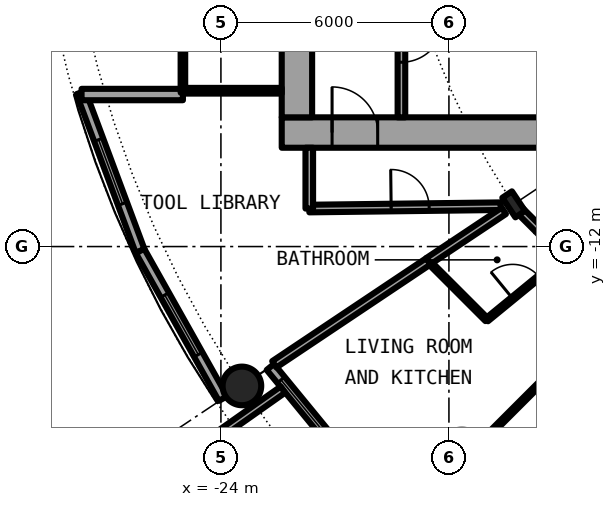
"""IFC4 building model, lengths in metres.
Left out: names, types, materials, properties, quantities, classifications, styles, units other than length and angle.
Written with IfcOpenShell. Run it as: python <this file> out.ifc"""

import sys

from ifc_helpers import new_model, si_unit, direction, frame, frame_2d, origin, origin_2d, place, context, subcontext, project, spatial, rectangle, hollow_circle, i_section, extrude, element, fill, save


model = new_model("IFC4")
c1 = context("Model", 3, precision=1e-05, world=origin(), true_north=direction((0.0, 1.0)))
c2 = subcontext(c1, "Body", "Model", "MODEL_VIEW")
j1 = project(units=[si_unit("LENGTHUNIT", "METRE"), si_unit("PLANEANGLEUNIT", "RADIAN")], contexts=[c1])
p1 = place(None, origin())
s1 = spatial("IfcSite", under=j1, at=p1, CompositionType="ELEMENT")
p2 = place(p1, origin())
s2 = spatial("IfcBuilding", under=s1, at=p2, CompositionType="ELEMENT")
p3 = place(p2, frame((0.0, 0.0, 22.8)))
s3 = spatial("IfcBuildingStorey", under=s2, at=p3, CompositionType="ELEMENT", Elevation=22.8)
p4 = place(p3, frame((-23.448, -15.667, 0.0), z_axis=(0.0, 0.0, 1.0), x_axis=(1.0, 0.0, 0.0)))
e1 = element("IfcColumn", 1, at=p4, inside=s3, PredefinedType="COLUMN", context=c2, shape_type="SweptSolid", body=[
    extrude(hollow_circle(Radius=0.508, WallThickness=0.05, at=origin_2d()), origin(), (0.0, 0.0, 1.0), 3.05),
])
p5 = place(p3, frame((-16.297, -10.889, 0.0), z_axis=(0.0, 0.0, 1.0), x_axis=(-0.831469612303, -0.55557023302, 0.0)))
e2 = element("IfcColumn", 2, at=p5, inside=s3, PredefinedType="COLUMN", context=c2, shape_type="SweptSolid", body=[
    extrude(i_section(OverallWidth=0.305, OverallDepth=0.62, WebThickness=0.021, FlangeThickness=0.04, FilletRadius=0.027, at=origin_2d()), origin(), (0.0, 0.0, 1.0), 3.05),
])
p6 = place(p3, frame((-22.699, -15.167, 0.0), z_axis=(0.0, 0.0, 1.0), x_axis=(0.634382322723, -0.773019449054, 0.0)))
e3 = element("IfcWall", 3, at=p6, inside=s3, PredefinedType="SOLIDWALL", context=c2, shape_type="SweptSolid", body=[
    extrude(rectangle(XDim=5.352, YDim=0.25, at=frame_2d((2.676, 0.0))), origin(), (0.0, 0.0, 1.0), 2.7),
])
p7 = place(p6, frame((0.441, 0.0, 0.3)))
e4 = element("IfcOpeningElement", 4, at=p7, cuts=e3, PredefinedType="OPENING", context=c2, shape_type="SweptSolid", body=[
    extrude(rectangle(XDim=1.8, YDim=2.1, at=frame_2d((0.9, 1.05))), frame((0.0, 0.135, 0.0), z_axis=(0.0, -1.0, 0.0), x_axis=(1.0, 0.0, 0.0)), (0.0, 0.0, 1.0), 0.27),
])
p8 = place(p6, frame((3.51, 0.0, 0.0)))
e5 = element("IfcOpeningElement", 5, at=p8, cuts=e3, PredefinedType="OPENING", context=c2, shape_type="SweptSolid", body=[
    extrude(rectangle(XDim=1.0, YDim=2.2, at=frame_2d((0.5, 1.1))), frame((0.0, 0.135, 0.0), z_axis=(0.0, -1.0, 0.0), x_axis=(1.0, 0.0, 0.0)), (0.0, 0.0, 1.0), 0.27),
])
p9 = place(p3, frame((-22.37, -15.765, -0.03), z_axis=(0.0, 0.0, 1.0), x_axis=(-0.817256123454, -0.576274612209, 0.0)))
e6 = element("IfcWall", 6, at=p9, inside=s3, PredefinedType="SOLIDWALL", context=c2, shape_type="SweptSolid", body=[
    extrude(rectangle(XDim=2.933, YDim=0.2, at=frame_2d((1.466, 0.0))), origin(), (0.0, 0.0, 1.0), 2.73),
])
p10 = place(p3, frame((-27.682, -7.945, 0.0), z_axis=(0.0, 0.0, 1.0), x_axis=(0.349247811493, -0.937030397675, 0.0)))
e7 = element("IfcWall", 7, at=p10, inside=s3, PredefinedType="SOLIDWALL", context=c2, shape_type="SweptSolid", body=[
    extrude(rectangle(XDim=4.452, YDim=0.25, at=frame_2d((2.226, 0.0))), origin(), (0.0, 0.0, 1.0), 2.7),
])
p11 = place(p10, frame((1.327, 0.0, 0.3)))
e8 = element("IfcOpeningElement", 8, at=p11, cuts=e7, PredefinedType="OPENING", context=c2, shape_type="SweptSolid", body=[
    extrude(rectangle(XDim=1.8, YDim=2.1, at=frame_2d((0.9, 1.05))), frame((0.0, 0.135, 0.0), z_axis=(0.0, -1.0, 0.0), x_axis=(1.0, 0.0, 0.0)), (0.0, 0.0, 1.0), 0.27),
])
p12 = place(p3, frame((-26.127, -12.117, 0.0), z_axis=(0.0, 0.0, 1.0), x_axis=(0.489696356642, -0.871893042919, 0.0)))
e9 = element("IfcWall", 9, at=p12, inside=s3, PredefinedType="SOLIDWALL", context=c2, shape_type="SweptSolid", body=[
    extrude(rectangle(XDim=4.454, YDim=0.25, at=frame_2d((2.227, 0.0))), origin(), (0.0, 0.0, 1.0), 2.7),
])
p13 = place(p12, frame((1.327, 0.0, 0.3)))
e10 = element("IfcOpeningElement", 10, at=p13, cuts=e9, PredefinedType="OPENING", context=c2, shape_type="SweptSolid", body=[
    extrude(rectangle(XDim=1.8, YDim=2.1, at=frame_2d((0.9, 1.05))), frame((0.0, 0.135, 0.0), z_axis=(0.0, -1.0, 0.0), x_axis=(1.0, 0.0, 0.0)), (0.0, 0.0, 1.0), 0.27),
])
p14 = place(p3, frame((-25.0, -8.0, 0.0), z_axis=(0.0, 0.0, 1.0), x_axis=(-1.0, 0.0, 0.0)))
e11 = element("IfcWall", 11, at=p14, inside=s3, PredefinedType="SOLIDWALL", context=c2, shape_type="SweptSolid", body=[
    extrude(rectangle(XDim=2.667, YDim=0.3, at=frame_2d((1.333, 0.0))), origin(), (0.0, 0.0, 1.0), 2.7),
])
p15 = place(p3, frame((-22.4, -9.0, 0.0), z_axis=(0.0, 0.0, 1.0), x_axis=(1.0, 0.0, 0.0)))
e12 = element("IfcWall", 12, at=p15, inside=s3, PredefinedType="SHEAR", context=c2, shape_type="SweptSolid", body=[
    extrude(rectangle(XDim=14.2, YDim=0.8, at=frame_2d((7.1, 0.0))), origin(), (0.0, 0.0, 1.0), 3.05),
])
p16 = place(p15, frame((1.325, 0.0, 0.0)))
e13 = element("IfcOpeningElement", 13, at=p16, cuts=e12, PredefinedType="OPENING", context=c2, shape_type="SweptSolid", body=[
    extrude(rectangle(XDim=1.2, YDim=2.3, at=frame_2d((0.6, 1.15))), frame((0.0, 0.41, 0.0), z_axis=(0.0, -1.0, 0.0), x_axis=(1.0, 0.0, 0.0)), (0.0, 0.0, 1.0), 0.82),
])
p17 = place(p3, frame((-22.0, -8.6, 0.0), z_axis=(0.0, 0.0, 1.0), x_axis=(0.0, 1.0, 0.0)))
e14 = element("IfcWall", 14, at=p17, inside=s3, PredefinedType="SHEAR", context=c2, shape_type="SweptSolid", body=[
    extrude(rectangle(XDim=17.2, YDim=0.8, at=frame_2d((8.6, 0.0))), origin(), (0.0, 0.0, 1.0), 3.05),
])
p18 = place(p17, frame((7.7, 0.0, 0.0)))
e15 = element("IfcOpeningElement", 15, at=p18, cuts=e14, PredefinedType="OPENING", context=c2, shape_type="SweptSolid", body=[
    extrude(rectangle(XDim=1.8, YDim=2.3, at=frame_2d((0.9, 1.15))), frame((0.0, 0.41, 0.0), z_axis=(0.0, -1.0, 0.0), x_axis=(1.0, 0.0, 0.0)), (0.0, 0.0, 1.0), 0.82),
])
p19 = place(p3, frame((-19.25, -1.575, 0.0), z_axis=(0.0, 0.0, 1.0), x_axis=(0.0, -1.0, 0.0)))
e16 = element("IfcWall", 16, at=p19, inside=s3, PredefinedType="SOLIDWALL", context=c2, shape_type="SweptSolid", body=[
    extrude(rectangle(XDim=7.025, YDim=0.2, at=frame_2d((3.513, 0.0))), origin(), (0.0, 0.0, 1.0), 2.7),
])
p20 = place(p19, frame((4.475, 0.0, 0.0)))
e17 = element("IfcOpeningElement", 17, at=p20, cuts=e16, PredefinedType="OPENING", context=c2, shape_type="SweptSolid", body=[
    extrude(rectangle(XDim=1.1, YDim=2.3, at=frame_2d((0.55, 1.15))), frame((0.0, 0.11, 0.0), z_axis=(0.0, -1.0, 0.0), x_axis=(1.0, 0.0, 0.0)), (0.0, 0.0, 1.0), 0.22),
])
p21 = place(p3, frame((-22.4, -7.9, 0.0), z_axis=(0.0, 0.0, 1.0), x_axis=(-1.0, 0.0, 0.0)))
e18 = element("IfcWall", 18, at=p21, inside=s3, PredefinedType="PARTITIONING", context=c2, shape_type="SweptSolid", body=[
    extrude(rectangle(XDim=2.54, YDim=0.15, at=frame_2d((1.27, 0.0))), origin(), (0.0, 0.0, 1.0), 2.7),
])
p22 = place(p3, frame((-25.0, 7.95, 0.0), z_axis=(0.0, 0.0, 1.0), x_axis=(0.0, -1.0, 0.0)))
e19 = element("IfcWall", 19, at=p22, inside=s3, PredefinedType="PARTITIONING", context=c2, shape_type="SweptSolid", body=[
    extrude(rectangle(XDim=15.9, YDim=0.12, at=frame_2d((7.95, 0.0))), origin(), (0.0, 0.0, 1.0), 2.7),
])
p23 = place(p22, frame((0.95, 0.0, 0.1)))
e20 = element("IfcOpeningElement", 20, at=p23, cuts=e19, PredefinedType="OPENING", context=c2, shape_type="SweptSolid", body=[
    extrude(rectangle(XDim=14.0, YDim=2.35, at=frame_2d((7.0, 1.175))), frame((0.0, 0.07, 0.0), z_axis=(0.0, -1.0, 0.0), x_axis=(1.0, 0.0, 0.0)), (0.0, 0.0, 1.0), 0.14),
])
p24 = place(p3, frame((-18.542, -12.389, 0.0), z_axis=(0.0, 0.0, 1.0), x_axis=(0.707106781187, -0.707106781187, 0.0)))
e21 = element("IfcWall", 21, at=p24, inside=s3, PredefinedType="PARTITIONING", context=c2, shape_type="SweptSolid", body=[
    extrude(rectangle(XDim=2.175, YDim=0.1, at=frame_2d((1.088, 0.0))), origin(), (0.0, 0.0, 1.0), 2.7),
])
p25 = place(p3, frame((-16.187, -10.999, 0.0), z_axis=(0.0, 0.0, 1.0), x_axis=(0.707106781187, -0.707106781187, 0.0)))
e22 = element("IfcWall", 22, at=p25, inside=s3, PredefinedType="PARTITIONING", context=c2, shape_type="SweptSolid", body=[
    extrude(rectangle(XDim=7.337, YDim=0.2, at=frame_2d((3.668, 0.0))), origin(), (0.0, 0.0, 1.0), 2.38),
])
p26 = place(p25, frame((4.124, 0.0, 0.0)))
e23 = element("IfcOpeningElement", 23, at=p26, cuts=e22, PredefinedType="OPENING", context=c2, shape_type="SweptSolid", body=[
    extrude(rectangle(XDim=1.0, YDim=2.3, at=frame_2d((0.5, 1.15))), frame((0.0, 0.11, 0.0), z_axis=(0.0, -1.0, 0.0), x_axis=(1.0, 0.0, 0.0)), (0.0, 0.0, 1.0), 0.22),
])
p27 = place(p3, frame((-21.675, -11.0, 0.0), z_axis=(0.0, 0.0, 1.0), x_axis=(0.99992425795, 0.012307654658, 0.0)))
e24 = element("IfcWall", 24, at=p27, inside=s3, PredefinedType="PARTITIONING", context=c2, shape_type="SweptSolid", body=[
    extrude(rectangle(XDim=5.039, YDim=0.2, at=frame_2d((2.519, 0.0))), origin(), (0.0, 0.0, 1.0), 2.7),
])
p28 = place(p27, frame((2.155, 0.0, 0.0)))
e25 = element("IfcOpeningElement", 25, at=p28, cuts=e24, PredefinedType="OPENING", context=c2, shape_type="SweptSolid", body=[
    extrude(rectangle(XDim=1.0, YDim=2.3, at=frame_2d((0.5, 1.15))), frame((0.0, 0.11, 0.0), z_axis=(0.0, -1.0, 0.0), x_axis=(1.0, 0.0, 0.0)), (0.0, 0.0, 1.0), 0.22),
])
p29 = place(p3, frame((-18.544, -12.387, 0.0), z_axis=(0.0, 0.0, 1.0), x_axis=(0.832066006555, 0.554676627176, 0.0)))
e26 = element("IfcWall", 26, at=p29, inside=s3, PredefinedType="PARTITIONING", context=c2, shape_type="SweptSolid", body=[
    extrude(rectangle(XDim=2.39, YDim=0.2, at=frame_2d((1.195, 0.0))), origin(), (0.0, 0.0, 1.0), 2.7),
])
p30 = place(p3, frame((-22.595, -15.098, 0.0), z_axis=(0.0, 0.0, 1.0), x_axis=(0.831387096605, 0.55569370664, 0.0)))
e27 = element("IfcWall", 27, at=p30, inside=s3, PredefinedType="PARTITIONING", context=c2, shape_type="SweptSolid", body=[
    extrude(rectangle(XDim=4.875, YDim=0.2, at=frame_2d((2.438, 0.0))), origin(), (0.0, 0.0, 1.0), 2.7),
])
p31 = place(p3, frame((-19.216, -19.216, 0.0), z_axis=(0.0, 0.0, 1.0), x_axis=(0.707106781187, 0.707106781187, 0.0)))
e28 = element("IfcWall", 28, at=p31, inside=s3, PredefinedType="PARTITIONING", context=c2, shape_type="SweptSolid", body=[
    extrude(rectangle(XDim=5.305, YDim=0.1, at=frame_2d((2.652, 0.0))), origin(), (0.0, 0.0, 1.0), 2.7),
])
p32 = place(p31, frame((2.202, 0.0, 0.0)))
e29 = element("IfcOpeningElement", 29, at=p32, cuts=e28, PredefinedType="OPENING", context=c2, shape_type="SweptSolid", body=[
    extrude(rectangle(XDim=0.9, YDim=2.3, at=frame_2d((0.45, 1.15))), frame((0.0, 0.06, 0.0), z_axis=(0.0, -1.0, 0.0), x_axis=(1.0, 0.0, 0.0)), (0.0, 0.0, 1.0), 0.12),
])
p33 = place(p3, frame((-17.004, -13.927, 0.0), z_axis=(0.0, 0.0, 1.0), x_axis=(0.77367517848, 0.633582447834, 0.0)))
e30 = element("IfcWall", 30, at=p33, inside=s3, PredefinedType="PARTITIONING", context=c2, shape_type="SweptSolid", body=[
    extrude(rectangle(XDim=2.661, YDim=0.1, at=frame_2d((1.331, 0.0))), origin(), (0.0, 0.0, 1.0), 2.7),
])
p34 = place(p33, frame((0.881, 0.0, 0.0)))
e31 = element("IfcOpeningElement", 31, at=p34, cuts=e30, PredefinedType="OPENING", context=c2, shape_type="SweptSolid", body=[
    extrude(rectangle(XDim=0.9, YDim=2.3, at=frame_2d((0.45, 1.15))), frame((0.0, 0.06, 0.0), z_axis=(0.0, -1.0, 0.0), x_axis=(1.0, 0.0, 0.0)), (0.0, 0.0, 1.0), 0.12),
])
p35 = place(p3, frame((-21.675, -11.0, 0.0), z_axis=(0.0, 0.0, 1.0), x_axis=(0.0, 1.0, 0.0)))
e32 = element("IfcWall", 32, at=p35, inside=s3, PredefinedType="PARTITIONING", context=c2, shape_type="SweptSolid", body=[
    extrude(rectangle(XDim=1.6, YDim=0.2, at=frame_2d((0.8, 0.0))), origin(), (0.0, 0.0, 1.0), 2.7),
])
p36 = place(p7, origin())
e33 = element("IfcWindow", 33, at=p36, inside=s3, PartitioningType="SINGLE_PANEL", PredefinedType="WINDOW", context=c2, shape_type="SweptSolid", body=[
    extrude(rectangle(XDim=1.8, YDim=2.1, at=frame_2d((0.9, 1.05))), frame((0.0, 0.03, 0.0), z_axis=(0.0, -1.0, 0.0), x_axis=(1.0, 0.0, 0.0)), (0.0, 0.0, 1.0), 0.06),
])
fill(e4, e33)
p37 = place(p11, origin())
e34 = element("IfcWindow", 34, at=p37, inside=s3, PartitioningType="SINGLE_PANEL", PredefinedType="WINDOW", context=c2, shape_type="SweptSolid", body=[
    extrude(rectangle(XDim=1.8, YDim=2.1, at=frame_2d((0.9, 1.05))), frame((0.0, 0.03, 0.0), z_axis=(0.0, -1.0, 0.0), x_axis=(1.0, 0.0, 0.0)), (0.0, 0.0, 1.0), 0.06),
])
fill(e8, e34)
p38 = place(p13, origin())
e35 = element("IfcWindow", 35, at=p38, inside=s3, PartitioningType="SINGLE_PANEL", PredefinedType="WINDOW", context=c2, shape_type="SweptSolid", body=[
    extrude(rectangle(XDim=1.8, YDim=2.1, at=frame_2d((0.9, 1.05))), frame((0.0, 0.03, 0.0), z_axis=(0.0, -1.0, 0.0), x_axis=(1.0, 0.0, 0.0)), (0.0, 0.0, 1.0), 0.06),
])
fill(e10, e35)
p39 = place(p20, origin())
e36 = element("IfcDoor", 36, at=p39, inside=s3, OperationType="SINGLE_SWING_LEFT", PredefinedType="DOOR", context=c2, shape_type="SweptSolid", body=[
    extrude(rectangle(XDim=1.1, YDim=2.3, at=frame_2d((0.55, 1.15))), frame((0.0, 0.025, 0.0), z_axis=(0.0, -1.0, 0.0), x_axis=(1.0, 0.0, 0.0)), (0.0, 0.0, 1.0), 0.05),
])
fill(e17, e36)
p40 = place(p16, origin())
e37 = element("IfcDoor", 37, at=p40, inside=s3, OperationType="SINGLE_SWING_RIGHT", PredefinedType="DOOR", context=c2, shape_type="SweptSolid", body=[
    extrude(rectangle(XDim=1.2, YDim=2.3, at=frame_2d((0.6, 1.15))), frame((0.0, 0.025, 0.0), z_axis=(0.0, -1.0, 0.0), x_axis=(1.0, 0.0, 0.0)), (0.0, 0.0, 1.0), 0.05),
])
fill(e13, e37)
p41 = place(p23, origin())
e38 = element("IfcWindow", 38, at=p41, inside=s3, PartitioningType="SINGLE_PANEL", PredefinedType="WINDOW", context=c2, shape_type="SweptSolid", body=[
    extrude(rectangle(XDim=14.0, YDim=2.35, at=frame_2d((7.0, 1.175))), frame((0.0, 0.03, 0.0), z_axis=(0.0, -1.0, 0.0), x_axis=(1.0, 0.0, 0.0)), (0.0, 0.0, 1.0), 0.06),
])
fill(e20, e38)
p42 = place(p34, origin())
e39 = element("IfcDoor", 39, at=p42, inside=s3, OperationType="SINGLE_SWING_RIGHT", PredefinedType="DOOR", context=c2, shape_type="SweptSolid", body=[
    extrude(rectangle(XDim=0.9, YDim=2.3, at=frame_2d((0.45, 1.15))), frame((0.0, 0.025, 0.0), z_axis=(0.0, -1.0, 0.0), x_axis=(1.0, 0.0, 0.0)), (0.0, 0.0, 1.0), 0.05),
])
fill(e31, e39)
p43 = place(p28, origin())
e40 = element("IfcDoor", 40, at=p43, inside=s3, OperationType="SINGLE_SWING_RIGHT", PredefinedType="DOOR", context=c2, shape_type="SweptSolid", body=[
    extrude(rectangle(XDim=1.0, YDim=2.3, at=frame_2d((0.5, 1.15))), frame((0.0, 0.025, 0.0), z_axis=(0.0, -1.0, 0.0), x_axis=(1.0, 0.0, 0.0)), (0.0, 0.0, 1.0), 0.05),
])
fill(e25, e40)
save(model, sys.argv[1])
